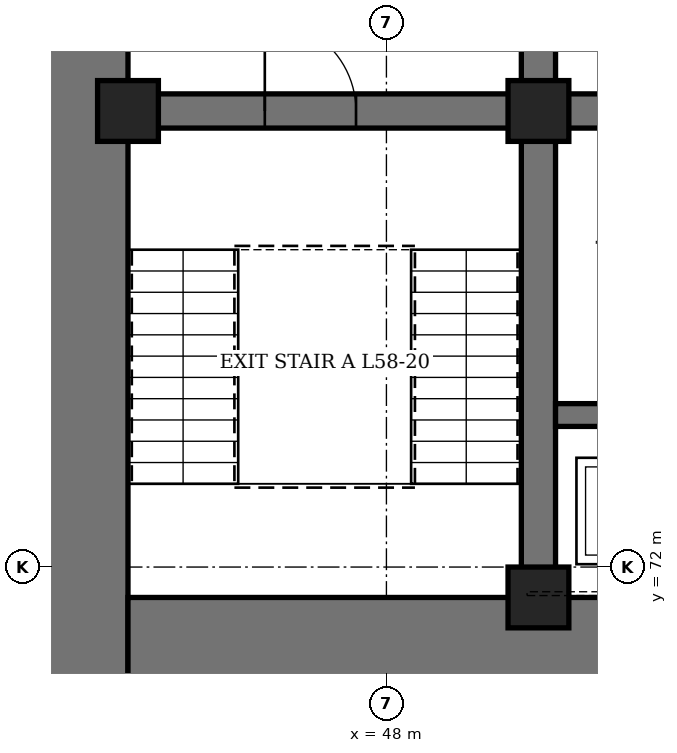
"""IFC4 building model, lengths in metres.
Left out: names, types, materials, properties, quantities, classifications, styles, units other than length and angle.
Written with IfcOpenShell. Run it as: python <this file> out.ifc"""

import sys

from ifc_helpers import new_model, si_unit, direction, frame, frame_2d, origin, origin_2d, place, context, subcontext, project, spatial, rectangle, hollow_rectangle, extrude, element, fill, save


model = new_model("IFC4")
c1 = context("Model", 3, precision=1e-05, world=origin(), true_north=direction((0.0, 1.0)))
c2 = subcontext(c1, "Body", "Model", "MODEL_VIEW")
j1 = project(units=[si_unit("LENGTHUNIT", "METRE"), si_unit("PLANEANGLEUNIT", "RADIAN")], contexts=[c1])
p1 = place(None, origin())
s1 = spatial("IfcSite", under=j1, at=p1, CompositionType="ELEMENT")
p2 = place(p1, origin())
s2 = spatial("IfcBuilding", under=s1, at=p2, CompositionType="ELEMENT")
p3 = place(p2, frame((0.0, 0.0, 258.7)))
s3 = spatial("IfcBuildingStorey", under=s2, at=p3, CompositionType="ELEMENT", Elevation=258.7)
p4 = place(p3, frame((44.0, 70.4, 0.0), z_axis=(0.0, 0.0, 1.0), x_axis=(0.0, 1.0, 0.0)))
e1 = element("IfcWall", 1, at=p4, inside=s3, PredefinedType="SHEAR", context=c2, shape_type="SweptSolid", body=[
    extrude(rectangle(XDim=19.2, YDim=1.2, at=frame_2d((9.6, 0.0))), origin(), (0.0, 0.0, 1.0), 4.2),
])
p5 = place(p4, frame((8.6, 0.0, 0.0)))
e2 = element("IfcOpeningElement", 2, at=p5, cuts=e1, PredefinedType="OPENING", context=c2, shape_type="SweptSolid", body=[
    extrude(rectangle(XDim=2.0, YDim=2.4, at=frame_2d((1.0, 1.2))), frame((0.0, 0.61, 0.0), z_axis=(0.0, -1.0, 0.0), x_axis=(1.0, 0.0, 0.0)), (0.0, 0.0, 1.0), 1.22),
])
p6 = place(p3, frame((44.6, 71.0, 0.0), z_axis=(0.0, 0.0, 1.0), x_axis=(1.0, 0.0, 0.0)))
e3 = element("IfcWall", 3, at=p6, inside=s3, PredefinedType="SHEAR", context=c2, shape_type="SweptSolid", body=[
    extrude(rectangle(XDim=22.8, YDim=1.2, at=frame_2d((11.4, 0.0))), origin(), (0.0, 0.0, 1.0), 4.2),
])
p7 = place(p6, frame((6.35, 0.0, 0.0)))
e4 = element("IfcOpeningElement", 4, at=p7, cuts=e3, PredefinedType="OPENING", context=c2, shape_type="SweptSolid", body=[
    extrude(rectangle(XDim=1.1, YDim=2.2, at=frame_2d((0.55, 1.1))), frame((0.0, 0.61, 0.0), z_axis=(0.0, -1.0, 0.0), x_axis=(1.0, 0.0, 0.0)), (0.0, 0.0, 1.0), 1.22),
])
p8 = place(p6, frame((9.35, 0.0, 0.0)))
e5 = element("IfcOpeningElement", 5, at=p8, cuts=e3, PredefinedType="OPENING", context=c2, shape_type="SweptSolid", body=[
    extrude(rectangle(XDim=1.1, YDim=2.2, at=frame_2d((0.55, 1.1))), frame((0.0, 0.61, 0.0), z_axis=(0.0, -1.0, 0.0), x_axis=(1.0, 0.0, 0.0)), (0.0, 0.0, 1.0), 1.22),
])
p9 = place(p6, frame((12.35, 0.0, 0.0)))
e6 = element("IfcOpeningElement", 6, at=p9, cuts=e3, PredefinedType="OPENING", context=c2, shape_type="SweptSolid", body=[
    extrude(rectangle(XDim=1.1, YDim=2.2, at=frame_2d((0.55, 1.1))), frame((0.0, 0.61, 0.0), z_axis=(0.0, -1.0, 0.0), x_axis=(1.0, 0.0, 0.0)), (0.0, 0.0, 1.0), 1.22),
])
p10 = place(p6, frame((15.35, 0.0, 0.0)))
e7 = element("IfcOpeningElement", 7, at=p10, cuts=e3, PredefinedType="OPENING", context=c2, shape_type="SweptSolid", body=[
    extrude(rectangle(XDim=1.1, YDim=2.2, at=frame_2d((0.55, 1.1))), frame((0.0, 0.61, 0.0), z_axis=(0.0, -1.0, 0.0), x_axis=(1.0, 0.0, 0.0)), (0.0, 0.0, 1.0), 1.22),
])
p11 = place(p3, frame((50.0, 71.6, 0.0), z_axis=(0.0, 0.0, 1.0), x_axis=(0.0, 1.0, 0.0)))
e8 = element("IfcWall", 8, at=p11, inside=s3, PredefinedType="SHEAR", context=c2, shape_type="SweptSolid", body=[
    extrude(rectangle(XDim=16.8, YDim=0.45, at=frame_2d((8.4, 0.0))), origin(), (0.0, 0.0, 1.0), 4.2),
])
p12 = place(p11, frame((7.5, 0.0, 0.0)))
e9 = element("IfcOpeningElement", 9, at=p12, cuts=e8, PredefinedType="OPENING", context=c2, shape_type="SweptSolid", body=[
    extrude(rectangle(XDim=1.8, YDim=2.4, at=frame_2d((0.9, 1.2))), frame((0.0, 0.235, 0.0), z_axis=(0.0, -1.0, 0.0), x_axis=(1.0, 0.0, 0.0)), (0.0, 0.0, 1.0), 0.47),
])
p13 = place(p3, frame((44.6, 78.0, 0.0), z_axis=(0.0, 0.0, 1.0), x_axis=(1.0, 0.0, 0.0)))
e10 = element("IfcWall", 10, at=p13, inside=s3, PredefinedType="SHEAR", context=c2, shape_type="SweptSolid", body=[
    extrude(rectangle(XDim=5.175, YDim=0.45, at=frame_2d((2.587, 0.0))), origin(), (0.0, 0.0, 1.0), 4.2),
])
p14 = place(p13, frame((1.8, 0.0, 0.0)))
e11 = element("IfcOpeningElement", 11, at=p14, cuts=e10, PredefinedType="OPENING", context=c2, shape_type="SweptSolid", body=[
    extrude(rectangle(XDim=1.2, YDim=2.1, at=frame_2d((0.6, 1.05))), frame((0.0, 0.235, 0.0), z_axis=(0.0, -1.0, 0.0), x_axis=(1.0, 0.0, 0.0)), (0.0, 0.0, 1.0), 0.47),
])
p15 = place(p3, frame((50.225, 78.0, 0.0), z_axis=(0.0, 0.0, 1.0), x_axis=(1.0, 0.0, 0.0)))
e12 = element("IfcWall", 12, at=p15, inside=s3, PredefinedType="SHEAR", context=c2, shape_type="SweptSolid", body=[
    extrude(rectangle(XDim=11.55, YDim=0.45, at=frame_2d((5.775, 0.0))), origin(), (0.0, 0.0, 1.0), 4.2),
])
p16 = place(p15, frame((0.825, 0.0, 0.0)))
e13 = element("IfcOpeningElement", 13, at=p16, cuts=e12, PredefinedType="OPENING", context=c2, shape_type="SweptSolid", body=[
    extrude(rectangle(XDim=0.9, YDim=2.1, at=frame_2d((0.45, 1.05))), frame((0.0, 0.235, 0.0), z_axis=(0.0, -1.0, 0.0), x_axis=(1.0, 0.0, 0.0)), (0.0, 0.0, 1.0), 0.47),
])
p17 = place(p15, frame((3.825, 0.0, 0.0)))
e14 = element("IfcOpeningElement", 14, at=p17, cuts=e12, PredefinedType="OPENING", context=c2, shape_type="SweptSolid", body=[
    extrude(rectangle(XDim=0.9, YDim=2.1, at=frame_2d((0.45, 1.05))), frame((0.0, 0.235, 0.0), z_axis=(0.0, -1.0, 0.0), x_axis=(1.0, 0.0, 0.0)), (0.0, 0.0, 1.0), 0.47),
])
p18 = place(p15, frame((6.825, 0.0, 0.0)))
e15 = element("IfcOpeningElement", 15, at=p18, cuts=e12, PredefinedType="OPENING", context=c2, shape_type="SweptSolid", body=[
    extrude(rectangle(XDim=0.9, YDim=2.1, at=frame_2d((0.45, 1.05))), frame((0.0, 0.235, 0.0), z_axis=(0.0, -1.0, 0.0), x_axis=(1.0, 0.0, 0.0)), (0.0, 0.0, 1.0), 0.47),
])
p19 = place(p15, frame((9.825, 0.0, 0.0)))
e16 = element("IfcOpeningElement", 16, at=p19, cuts=e12, PredefinedType="OPENING", context=c2, shape_type="SweptSolid", body=[
    extrude(rectangle(XDim=0.9, YDim=2.1, at=frame_2d((0.45, 1.05))), frame((0.0, 0.235, 0.0), z_axis=(0.0, -1.0, 0.0), x_axis=(1.0, 0.0, 0.0)), (0.0, 0.0, 1.0), 0.47),
])
p20 = place(p3, frame((50.225, 74.0, 0.0), z_axis=(0.0, 0.0, 1.0), x_axis=(1.0, 0.0, 0.0)))
e17 = element("IfcWall", 17, at=p20, inside=s3, PredefinedType="SHEAR", context=c2, shape_type="SweptSolid", body=[
    extrude(rectangle(XDim=11.55, YDim=0.3, at=frame_2d((5.775, 0.0))), origin(), (0.0, 0.0, 1.0), 4.2),
])
for number, where, z_axis, x_axis in (
    (18, (44.6, 78.0, 0.0), (0.0, 0.0, 1.0), (1.0, 0.0, 0.0)),
    (19, (50.0, 71.6, 0.0), (0.0, 0.0, 1.0), (1.0, 0.0, 0.0)),
    (20, (50.0, 78.0, 0.0), (0.0, 0.0, 1.0), (1.0, 0.0, 0.0)),
):
    element("IfcColumn", number, at=place(p3, frame(where, z_axis=z_axis, x_axis=x_axis)), inside=s3, PredefinedType="COLUMN", context=c2, shape_type="SweptSolid", body=[
        extrude(hollow_rectangle(XDim=0.8, YDim=0.8, WallThickness=0.1, at=origin_2d()), origin(), (0.0, 0.0, 1.0), 4.2),
    ])
p21 = place(p14, origin())
e21 = element("IfcDoor", 21, at=p21, inside=s3, OperationType="SINGLE_SWING_LEFT", PredefinedType="DOOR", context=c2, shape_type="SweptSolid", body=[
    extrude(rectangle(XDim=1.2, YDim=2.1, at=frame_2d((0.6, 1.05))), frame((0.0, 0.225, 0.0), z_axis=(0.0, -1.0, 0.0), x_axis=(1.0, 0.0, 0.0)), (0.0, 0.0, 1.0), 0.449),
])
fill(e11, e21)
save(model, sys.argv[1])
